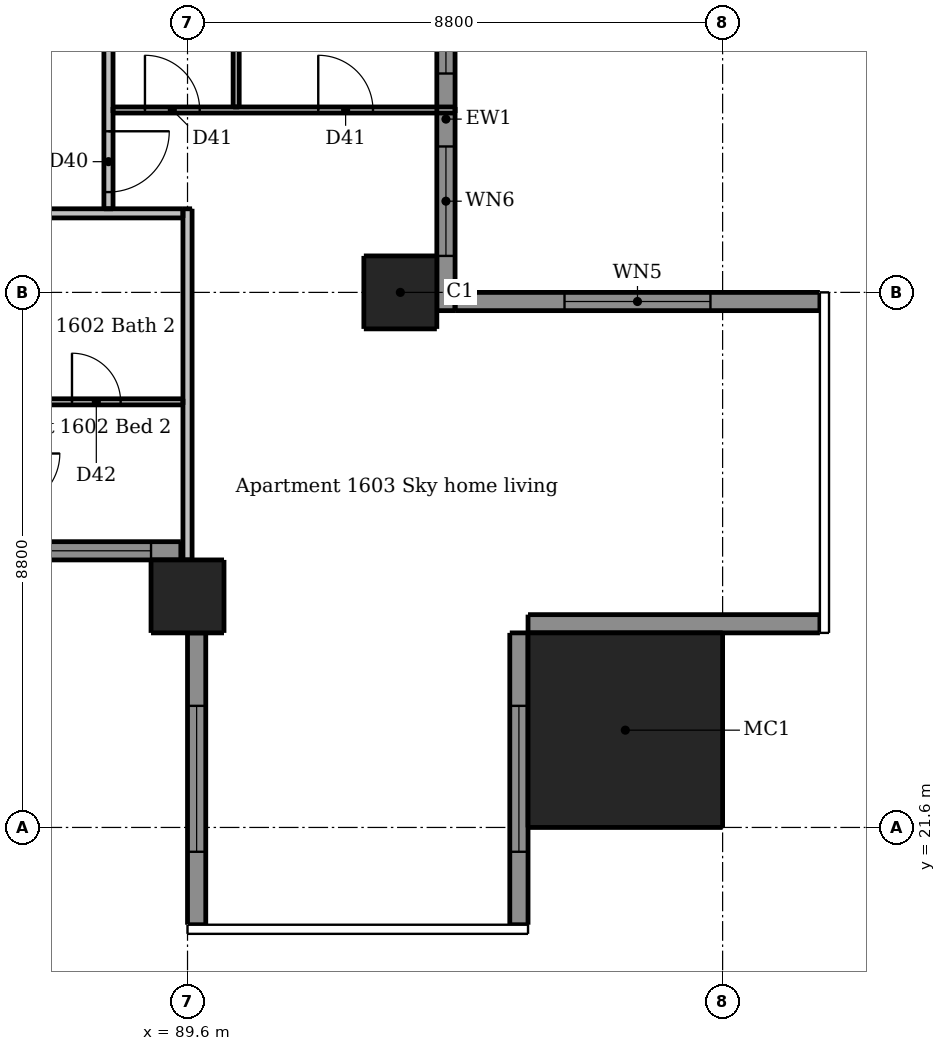
"""IFC4 building model, lengths in metres.
Left out: names, types, materials, properties, quantities, classifications, styles, units other than length and angle.
Written with IfcOpenShell. Run it as: python <this file> out.ifc"""

import sys

from ifc_helpers import new_model, si_unit, direction, frame, frame_2d, origin, origin_2d, place, context, subcontext, project, spatial, rectangle, extrude, element, fill, save


model = new_model("IFC4")
c1 = context("Model", 3, precision=1e-05, world=origin(), true_north=direction((0.0, 1.0)))
c2 = subcontext(c1, "Body", "Model", "MODEL_VIEW")
j1 = project(units=[si_unit("LENGTHUNIT", "METRE"), si_unit("PLANEANGLEUNIT", "RADIAN")], contexts=[c1])
p1 = place(None, origin())
s1 = spatial("IfcSite", under=j1, at=p1, CompositionType="ELEMENT")
p2 = place(p1, origin())
s2 = spatial("IfcBuilding", under=s1, at=p2, CompositionType="ELEMENT")
p3 = place(p2, frame((0.0, 0.0, 59.8)))
s3 = spatial("IfcBuildingStorey", under=s2, at=p3, CompositionType="ELEMENT", Elevation=59.8)
for number, where, z_axis, x_axis in (
    (1, (89.6, 25.4, 0.0), (0.0, 0.0, 1.0), (1.0, 0.0, 0.0)),
    (2, (93.1, 30.4, 0.0), (0.0, 0.0, 1.0), (1.0, 0.0, 0.0)),
):
    element("IfcColumn", number, at=place(p3, frame(where, z_axis=z_axis, x_axis=x_axis)), inside=s3, PredefinedType="COLUMN", context=c2, shape_type="SweptSolid", body=[
        extrude(rectangle(XDim=1.2, YDim=1.2, at=origin_2d()), origin(), (0.0, 0.0, 1.0), 3.05),
    ])
p4 = place(p3, frame((96.8, 23.2, 0.0), z_axis=(0.0, 0.0, 1.0), x_axis=(1.0, 0.0, 0.0)))
e3 = element("IfcColumn", 3, at=p4, inside=s3, PredefinedType="COLUMN", context=c2, shape_type="SweptSolid", body=[
    extrude(rectangle(XDim=3.2, YDim=3.2, at=origin_2d()), origin(), (0.0, 0.0, 1.0), 3.3),
])
p5 = place(p3, frame((89.75, 24.8, 0.0), z_axis=(0.0, 0.0, 1.0), x_axis=(0.0, -1.0, 0.0)))
e4 = element("IfcWall", 4, at=p5, inside=s3, PredefinedType="SOLIDWALL", context=c2, shape_type="SweptSolid", body=[
    extrude(rectangle(XDim=4.8, YDim=0.3, at=frame_2d((2.4, 0.0))), origin(), (0.0, 0.0, 1.0), 3.05),
])
p6 = place(p5, frame((1.2, 0.0, 0.15)))
e5 = element("IfcOpeningElement", 5, at=p6, cuts=e4, PredefinedType="OPENING", context=c2, shape_type="SweptSolid", body=[
    extrude(rectangle(XDim=2.4, YDim=2.1, at=frame_2d((1.2, 1.05))), frame((0.0, 0.16, 0.0), z_axis=(0.0, -1.0, 0.0), x_axis=(1.0, 0.0, 0.0)), (0.0, 0.0, 1.0), 0.32),
])
p7 = place(p3, frame((95.05, 20.0, 0.0), z_axis=(0.0, 0.0, 1.0), x_axis=(0.0, 1.0, 0.0)))
e6 = element("IfcWall", 6, at=p7, inside=s3, PredefinedType="SOLIDWALL", context=c2, shape_type="SweptSolid", body=[
    extrude(rectangle(XDim=4.8, YDim=0.3, at=frame_2d((2.4, 0.0))), origin(), (0.0, 0.0, 1.0), 3.05),
])
p8 = place(p7, frame((1.2, 0.0, 0.15)))
e7 = element("IfcOpeningElement", 7, at=p8, cuts=e6, PredefinedType="OPENING", context=c2, shape_type="SweptSolid", body=[
    extrude(rectangle(XDim=2.4, YDim=2.1, at=frame_2d((1.2, 1.05))), frame((0.0, 0.16, 0.0), z_axis=(0.0, -1.0, 0.0), x_axis=(1.0, 0.0, 0.0)), (0.0, 0.0, 1.0), 0.32),
])
p9 = place(p3, frame((95.2, 24.95, 0.0), z_axis=(0.0, 0.0, 1.0), x_axis=(1.0, 0.0, 0.0)))
e8 = element("IfcWall", 8, at=p9, inside=s3, PredefinedType="SOLIDWALL", context=c2, shape_type="SweptSolid", body=[
    extrude(rectangle(XDim=4.8, YDim=0.3, at=frame_2d((2.4, 0.0))), origin(), (0.0, 0.0, 1.0), 3.05),
])
p10 = place(p3, frame((100.0, 30.25, 0.0), z_axis=(0.0, 0.0, 1.0), x_axis=(-1.0, 0.0, 0.0)))
e9 = element("IfcWall", 9, at=p10, inside=s3, PredefinedType="SOLIDWALL", context=c2, shape_type="SweptSolid", body=[
    extrude(rectangle(XDim=6.0, YDim=0.3, at=frame_2d((3.0, 0.0))), origin(), (0.0, 0.0, 1.0), 3.05),
])
p11 = place(p10, frame((1.8, 0.0, 0.15)))
e10 = element("IfcOpeningElement", 10, at=p11, cuts=e9, PredefinedType="OPENING", context=c2, shape_type="SweptSolid", body=[
    extrude(rectangle(XDim=2.4, YDim=2.1, at=frame_2d((1.2, 1.05))), frame((0.0, 0.16, 0.0), z_axis=(0.0, -1.0, 0.0), x_axis=(1.0, 0.0, 0.0)), (0.0, 0.0, 1.0), 0.32),
])
p12 = place(p3, frame((83.6, 26.15, 0.0), z_axis=(0.0, 0.0, 1.0), x_axis=(1.0, 0.0, 0.0)))
e11 = element("IfcWall", 11, at=p12, inside=s3, PredefinedType="SOLIDWALL", context=c2, shape_type="SweptSolid", body=[
    extrude(rectangle(XDim=5.89, YDim=0.3, at=frame_2d((2.945, 0.0))), origin(), (0.0, 0.0, 1.0), 3.05),
])
p13 = place(p12, frame((0.6, 0.0, 0.15)))
e12 = element("IfcOpeningElement", 12, at=p13, cuts=e11, PredefinedType="OPENING", context=c2, shape_type="SweptSolid", body=[
    extrude(rectangle(XDim=1.8, YDim=2.1, at=frame_2d((0.9, 1.05))), frame((0.0, 0.16, 0.0), z_axis=(0.0, -1.0, 0.0), x_axis=(1.0, 0.0, 0.0)), (0.0, 0.0, 1.0), 0.32),
])
p14 = place(p12, frame((3.6, 0.0, 0.15)))
e13 = element("IfcOpeningElement", 13, at=p14, cuts=e11, PredefinedType="OPENING", context=c2, shape_type="SweptSolid", body=[
    extrude(rectangle(XDim=1.8, YDim=2.1, at=frame_2d((0.9, 1.05))), frame((0.0, 0.16, 0.0), z_axis=(0.0, -1.0, 0.0), x_axis=(1.0, 0.0, 0.0)), (0.0, 0.0, 1.0), 0.32),
])
p15 = place(p3, frame((93.85, 30.1, 0.0), z_axis=(0.0, 0.0, 1.0), x_axis=(0.0, 1.0, 0.0)))
e14 = element("IfcWall", 14, at=p15, inside=s3, PredefinedType="SOLIDWALL", context=c2, shape_type="SweptSolid", body=[
    extrude(rectangle(XDim=6.3, YDim=0.3, at=frame_2d((3.15, 0.0))), origin(), (0.0, 0.0, 1.0), 3.05),
])
p16 = place(p15, frame((0.9, 0.0, 0.15)))
e15 = element("IfcOpeningElement", 15, at=p16, cuts=e14, PredefinedType="OPENING", context=c2, shape_type="SweptSolid", body=[
    extrude(rectangle(XDim=1.8, YDim=2.1, at=frame_2d((0.9, 1.05))), frame((0.0, 0.16, 0.0), z_axis=(0.0, -1.0, 0.0), x_axis=(1.0, 0.0, 0.0)), (0.0, 0.0, 1.0), 0.32),
])
p17 = place(p15, frame((3.9, 0.0, 0.15)))
e16 = element("IfcOpeningElement", 16, at=p17, cuts=e14, PredefinedType="OPENING", context=c2, shape_type="SweptSolid", body=[
    extrude(rectangle(XDim=1.8, YDim=2.1, at=frame_2d((0.9, 1.05))), frame((0.0, 0.16, 0.0), z_axis=(0.0, -1.0, 0.0), x_axis=(1.0, 0.0, 0.0)), (0.0, 0.0, 1.0), 0.32),
])
p18 = place(p3, frame((90.4, 33.45, 0.0), z_axis=(0.0, 0.0, 1.0), x_axis=(0.0, 1.0, 0.0)))
e17 = element("IfcWall", 17, at=p18, inside=s3, PredefinedType="PARTITIONING", context=c2, shape_type="SweptSolid", body=[
    extrude(rectangle(XDim=9.1, YDim=0.1, at=frame_2d((4.55, 0.0))), origin(), (0.0, 0.0, 1.0), 3.05),
])
p19 = place(p18, frame((3.8, 0.0, 0.0)))
e18 = element("IfcOpeningElement", 18, at=p19, cuts=e17, PredefinedType="OPENING", context=c2, shape_type="SweptSolid", body=[
    extrude(rectangle(XDim=0.8, YDim=2.1, at=frame_2d((0.4, 1.05))), frame((0.0, 0.06, 0.0), z_axis=(0.0, -1.0, 0.0), x_axis=(1.0, 0.0, 0.0)), (0.0, 0.0, 1.0), 0.12),
])
p20 = place(p18, frame((7.1, 0.0, 0.0)))
e19 = element("IfcOpeningElement", 19, at=p20, cuts=e17, PredefinedType="OPENING", context=c2, shape_type="SweptSolid", body=[
    extrude(rectangle(XDim=0.9, YDim=2.1, at=frame_2d((0.45, 1.05))), frame((0.0, 0.06, 0.0), z_axis=(0.0, -1.0, 0.0), x_axis=(1.0, 0.0, 0.0)), (0.0, 0.0, 1.0), 0.12),
])
p21 = place(p3, frame((88.375, 33.4, 0.0), z_axis=(0.0, 0.0, 1.0), x_axis=(1.0, 0.0, 0.0)))
e20 = element("IfcWall", 20, at=p21, inside=s3, PredefinedType="PARTITIONING", context=c2, shape_type="SweptSolid", body=[
    extrude(rectangle(XDim=5.625, YDim=0.1, at=frame_2d((2.812, 0.0))), origin(), (0.0, 0.0, 1.0), 3.05),
])
p22 = place(p21, frame((0.525, 0.0, 0.0)))
e21 = element("IfcOpeningElement", 21, at=p22, cuts=e20, PredefinedType="OPENING", context=c2, shape_type="SweptSolid", body=[
    extrude(rectangle(XDim=0.9, YDim=2.1, at=frame_2d((0.45, 1.05))), frame((0.0, 0.06, 0.0), z_axis=(0.0, -1.0, 0.0), x_axis=(1.0, 0.0, 0.0)), (0.0, 0.0, 1.0), 0.12),
])
p23 = place(p21, frame((3.375, 0.0, 0.0)))
e22 = element("IfcOpeningElement", 22, at=p23, cuts=e20, PredefinedType="OPENING", context=c2, shape_type="SweptSolid", body=[
    extrude(rectangle(XDim=0.9, YDim=2.1, at=frame_2d((0.45, 1.05))), frame((0.0, 0.06, 0.0), z_axis=(0.0, -1.0, 0.0), x_axis=(1.0, 0.0, 0.0)), (0.0, 0.0, 1.0), 0.12),
])
p24 = place(p3, frame((83.65, 28.6, 0.0), z_axis=(0.0, 0.0, 1.0), x_axis=(1.0, 0.0, 0.0)))
e23 = element("IfcWall", 23, at=p24, inside=s3, PredefinedType="PARTITIONING", context=c2, shape_type="SweptSolid", body=[
    extrude(rectangle(XDim=5.875, YDim=0.1, at=frame_2d((2.938, 0.0))), origin(), (0.0, 0.0, 1.0), 3.05),
])
p25 = place(p24, frame((4.05, 0.0, 0.0)))
e24 = element("IfcOpeningElement", 24, at=p25, cuts=e23, PredefinedType="OPENING", context=c2, shape_type="SweptSolid", body=[
    extrude(rectangle(XDim=0.8, YDim=2.1, at=frame_2d((0.4, 1.05))), frame((0.0, 0.06, 0.0), z_axis=(0.0, -1.0, 0.0), x_axis=(1.0, 0.0, 0.0)), (0.0, 0.0, 1.0), 0.12),
])
p26 = place(p3, frame((88.3, 60.475, 0.0), z_axis=(0.0, 0.0, 1.0), x_axis=(0.0, -1.0, 0.0)))
e25 = element("IfcWall", 25, at=p26, inside=s3, PredefinedType="PARTITIONING", context=c2, shape_type="SweptSolid", body=[
    extrude(rectangle(XDim=28.7, YDim=0.15, at=frame_2d((14.35, 0.0))), origin(), (0.0, 0.0, 1.0), 3.05),
])
p27 = place(p26, frame((27.425, 0.0, 0.0)))
e26 = element("IfcOpeningElement", 26, at=p27, cuts=e25, PredefinedType="OPENING", context=c2, shape_type="SweptSolid", body=[
    extrude(rectangle(XDim=1.0, YDim=2.1, at=frame_2d((0.5, 1.05))), frame((0.0, 0.085, 0.0), z_axis=(0.0, -1.0, 0.0), x_axis=(1.0, 0.0, 0.0)), (0.0, 0.0, 1.0), 0.17),
])
p28 = place(p26, frame((14.525, 0.0, 0.0)))
e27 = element("IfcOpeningElement", 27, at=p28, cuts=e25, PredefinedType="OPENING", context=c2, shape_type="SweptSolid", body=[
    extrude(rectangle(XDim=1.0, YDim=2.1, at=frame_2d((0.5, 1.05))), frame((0.0, 0.085, 0.0), z_axis=(0.0, -1.0, 0.0), x_axis=(1.0, 0.0, 0.0)), (0.0, 0.0, 1.0), 0.17),
])
p29 = place(p26, frame((3.775, 0.0, 0.0)))
e28 = element("IfcOpeningElement", 28, at=p29, cuts=e25, PredefinedType="OPENING", context=c2, shape_type="SweptSolid", body=[
    extrude(rectangle(XDim=1.0, YDim=2.1, at=frame_2d((0.5, 1.05))), frame((0.0, 0.085, 0.0), z_axis=(0.0, -1.0, 0.0), x_axis=(1.0, 0.0, 0.0)), (0.0, 0.0, 1.0), 0.17),
])
p30 = place(p3, frame((89.6, 26.0, 0.0), z_axis=(0.0, 0.0, 1.0), x_axis=(0.0, 1.0, 0.0)))
e29 = element("IfcWall", 29, at=p30, inside=s3, PredefinedType="PARTITIONING", context=c2, shape_type="SweptSolid", body=[
    extrude(rectangle(XDim=5.775, YDim=0.15, at=frame_2d((2.887, 0.0))), origin(), (0.0, 0.0, 1.0), 2.516),
])
p31 = place(p3, frame((89.525, 31.7, 0.0), z_axis=(0.0, 0.0, 1.0), x_axis=(-1.0, 0.0, 0.0)))
e30 = element("IfcWall", 30, at=p31, inside=s3, PredefinedType="PARTITIONING", context=c2, shape_type="SweptSolid", body=[
    extrude(rectangle(XDim=28.75, YDim=0.15, at=frame_2d((14.375, 0.0))), origin(), (0.0, 0.0, 1.0), 3.05),
])
p32 = place(p31, frame((24.625, 0.0, 0.0)))
e31 = element("IfcOpeningElement", 31, at=p32, cuts=e30, PredefinedType="OPENING", context=c2, shape_type="SweptSolid", body=[
    extrude(rectangle(XDim=1.0, YDim=2.1, at=frame_2d((0.5, 1.05))), frame((0.0, 0.085, 0.0), z_axis=(0.0, -1.0, 0.0), x_axis=(1.0, 0.0, 0.0)), (0.0, 0.0, 1.0), 0.17),
])
p33 = place(p31, frame((8.425, 0.0, 0.0)))
e32 = element("IfcOpeningElement", 32, at=p33, cuts=e30, PredefinedType="OPENING", context=c2, shape_type="SweptSolid", body=[
    extrude(rectangle(XDim=1.0, YDim=2.1, at=frame_2d((0.5, 1.05))), frame((0.0, 0.085, 0.0), z_axis=(0.0, -1.0, 0.0), x_axis=(1.0, 0.0, 0.0)), (0.0, 0.0, 1.0), 0.17),
])
p34 = place(p6, origin())
e33 = element("IfcWindow", 33, at=p34, inside=s3, PartitioningType="DOUBLE_PANEL_VERTICAL", PredefinedType="WINDOW", context=c2, shape_type="SweptSolid", body=[
    extrude(rectangle(XDim=2.4, YDim=2.1, at=frame_2d((1.2, 1.05))), frame((0.0, 0.03, 0.0), z_axis=(0.0, -1.0, 0.0), x_axis=(1.0, 0.0, 0.0)), (0.0, 0.0, 1.0), 0.06),
])
fill(e5, e33)
p35 = place(p8, origin())
e34 = element("IfcWindow", 34, at=p35, inside=s3, PartitioningType="DOUBLE_PANEL_VERTICAL", PredefinedType="WINDOW", context=c2, shape_type="SweptSolid", body=[
    extrude(rectangle(XDim=2.4, YDim=2.1, at=frame_2d((1.2, 1.05))), frame((0.0, 0.03, 0.0), z_axis=(0.0, -1.0, 0.0), x_axis=(1.0, 0.0, 0.0)), (0.0, 0.0, 1.0), 0.06),
])
fill(e7, e34)
p36 = place(p11, origin())
e35 = element("IfcWindow", 35, at=p36, inside=s3, PartitioningType="DOUBLE_PANEL_VERTICAL", PredefinedType="WINDOW", context=c2, shape_type="SweptSolid", body=[
    extrude(rectangle(XDim=2.4, YDim=2.1, at=frame_2d((1.2, 1.05))), frame((0.0, 0.03, 0.0), z_axis=(0.0, -1.0, 0.0), x_axis=(1.0, 0.0, 0.0)), (0.0, 0.0, 1.0), 0.06),
])
fill(e10, e35)
p37 = place(p14, origin())
e36 = element("IfcWindow", 36, at=p37, inside=s3, PartitioningType="DOUBLE_PANEL_VERTICAL", PredefinedType="WINDOW", context=c2, shape_type="SweptSolid", body=[
    extrude(rectangle(XDim=1.8, YDim=2.1, at=frame_2d((0.9, 1.05))), frame((0.0, 0.03, 0.0), z_axis=(0.0, -1.0, 0.0), x_axis=(1.0, 0.0, 0.0)), (0.0, 0.0, 1.0), 0.06),
])
fill(e13, e36)
p38 = place(p16, origin())
e37 = element("IfcWindow", 37, at=p38, inside=s3, PartitioningType="DOUBLE_PANEL_VERTICAL", PredefinedType="WINDOW", context=c2, shape_type="SweptSolid", body=[
    extrude(rectangle(XDim=1.8, YDim=2.1, at=frame_2d((0.9, 1.05))), frame((0.0, 0.03, 0.0), z_axis=(0.0, -1.0, 0.0), x_axis=(1.0, 0.0, 0.0)), (0.0, 0.0, 1.0), 0.06),
])
fill(e15, e37)
p39 = place(p17, origin())
e38 = element("IfcWindow", 38, at=p39, inside=s3, PartitioningType="DOUBLE_PANEL_VERTICAL", PredefinedType="WINDOW", context=c2, shape_type="SweptSolid", body=[
    extrude(rectangle(XDim=1.8, YDim=2.1, at=frame_2d((0.9, 1.05))), frame((0.0, 0.03, 0.0), z_axis=(0.0, -1.0, 0.0), x_axis=(1.0, 0.0, 0.0)), (0.0, 0.0, 1.0), 0.06),
])
fill(e16, e38)
p40 = place(p25, origin())
e39 = element("IfcDoor", 39, at=p40, inside=s3, OperationType="SINGLE_SWING_LEFT", PredefinedType="DOOR", context=c2, shape_type="SweptSolid", body=[
    extrude(rectangle(XDim=0.8, YDim=2.1, at=frame_2d((0.4, 1.05))), frame((0.0, 0.025, 0.0), z_axis=(0.0, -1.0, 0.0), x_axis=(1.0, 0.0, 0.0)), (0.0, 0.0, 1.0), 0.05),
])
fill(e24, e39)
p41 = place(p27, origin())
e40 = element("IfcDoor", 40, at=p41, inside=s3, OperationType="SINGLE_SWING_LEFT", PredefinedType="DOOR", context=c2, shape_type="SweptSolid", body=[
    extrude(rectangle(XDim=1.0, YDim=2.1, at=frame_2d((0.5, 1.05))), frame((0.0, 0.025, 0.0), z_axis=(0.0, -1.0, 0.0), x_axis=(1.0, 0.0, 0.0)), (0.0, 0.0, 1.0), 0.05),
])
fill(e26, e40)
p42 = place(p22, origin())
e41 = element("IfcDoor", 41, at=p42, inside=s3, OperationType="SINGLE_SWING_LEFT", PredefinedType="DOOR", context=c2, shape_type="SweptSolid", body=[
    extrude(rectangle(XDim=0.9, YDim=2.1, at=frame_2d((0.45, 1.05))), frame((0.0, 0.025, 0.0), z_axis=(0.0, -1.0, 0.0), x_axis=(1.0, 0.0, 0.0)), (0.0, 0.0, 1.0), 0.05),
])
fill(e21, e41)
p43 = place(p23, origin())
e42 = element("IfcDoor", 42, at=p43, inside=s3, OperationType="SINGLE_SWING_LEFT", PredefinedType="DOOR", context=c2, shape_type="SweptSolid", body=[
    extrude(rectangle(XDim=0.9, YDim=2.1, at=frame_2d((0.45, 1.05))), frame((0.0, 0.025, 0.0), z_axis=(0.0, -1.0, 0.0), x_axis=(1.0, 0.0, 0.0)), (0.0, 0.0, 1.0), 0.05),
])
fill(e22, e42)
save(model, sys.argv[1])
